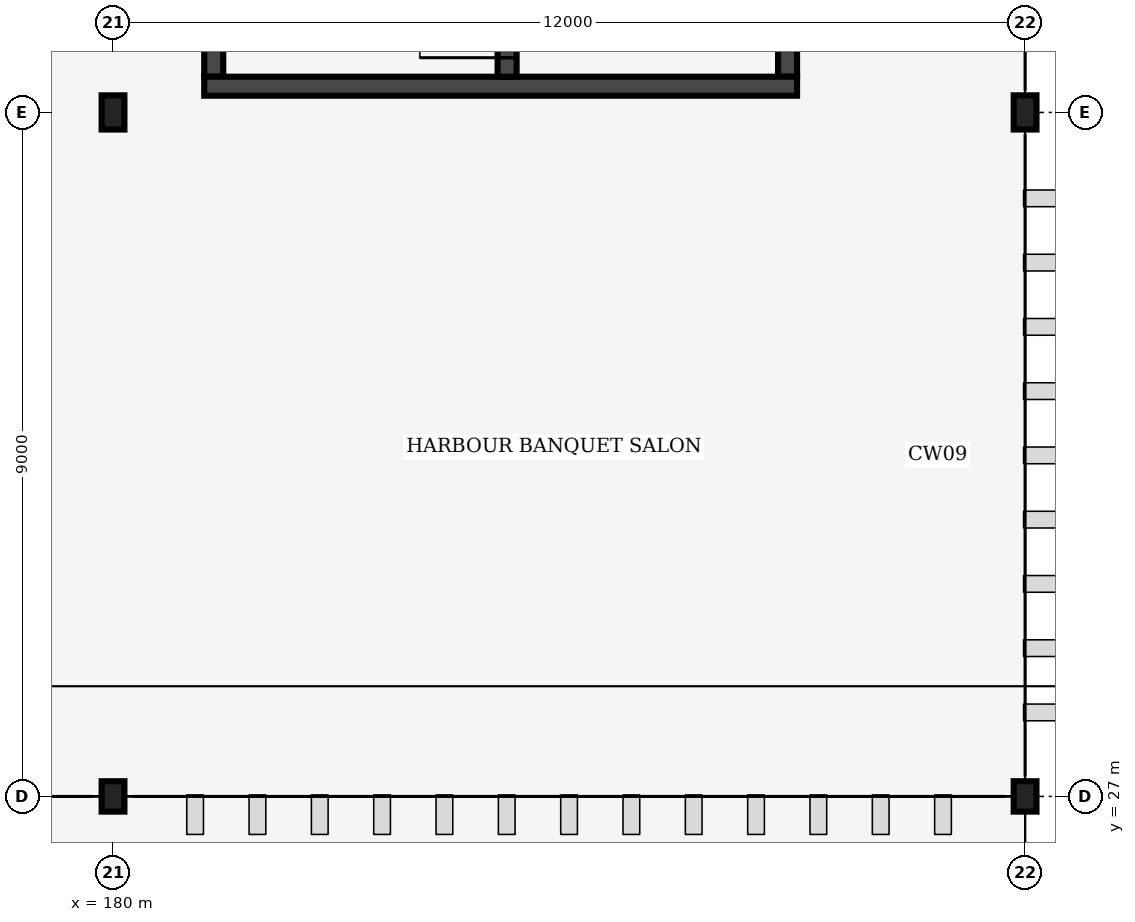
"""IFC4 building model, lengths in metres.
Left out: names, types, materials, properties, quantities, classifications, styles, units other than length and angle.
Written with IfcOpenShell. Run it as: python <this file> out.ifc"""

import sys

from ifc_helpers import new_model, si_unit, direction, frame, frame_2d, origin, origin_2d, place, context, subcontext, project, spatial, rectangle, i_section, extrude, element, fill, save


model = new_model("IFC4")
c1 = context("Model", 3, precision=1e-05, world=origin(), true_north=direction((0.0, 1.0)))
c2 = subcontext(c1, "Body", "Model", "MODEL_VIEW")
j1 = project(units=[si_unit("LENGTHUNIT", "METRE"), si_unit("PLANEANGLEUNIT", "RADIAN")], contexts=[c1])
p1 = place(None, origin())
s1 = spatial("IfcSite", under=j1, at=p1, CompositionType="ELEMENT")
p2 = place(p1, origin())
s2 = spatial("IfcBuilding", under=s1, at=p2, CompositionType="ELEMENT")
p3 = place(p2, frame((0.0, 0.0, 22.8)))
s3 = spatial("IfcBuildingStorey", under=s2, at=p3, CompositionType="ELEMENT", Elevation=22.8)
p4 = place(p3, frame((180.0, 27.0, 0.0), z_axis=(0.0, 0.0, 1.0), x_axis=(1.0, 0.0, 0.0)))
e1 = element("IfcColumn", 1, at=p4, inside=s3, PredefinedType="COLUMN", context=c2, shape_type="SweptSolid", body=[
    extrude(i_section(OverallWidth=0.3, OverallDepth=0.4, WebThickness=0.013, FlangeThickness=0.024, FilletRadius=0.027, at=origin_2d()), origin(), (0.0, 0.0, 1.0), 4.0),
])
p5 = place(p3, frame((180.0, 36.0, 0.0), z_axis=(0.0, 0.0, 1.0), x_axis=(1.0, 0.0, 0.0)))
e2 = element("IfcColumn", 2, at=p5, inside=s3, PredefinedType="COLUMN", context=c2, shape_type="SweptSolid", body=[
    extrude(i_section(OverallWidth=0.3, OverallDepth=0.45, WebThickness=0.014, FlangeThickness=0.026, FilletRadius=0.027, at=origin_2d()), origin(), (0.0, 0.0, 1.0), 4.0),
])
p6 = place(p3, frame((192.0, 27.0, 0.0), z_axis=(0.0, 0.0, 1.0), x_axis=(1.0, 0.0, 0.0)))
e3 = element("IfcColumn", 3, at=p6, inside=s3, PredefinedType="COLUMN", context=c2, shape_type="SweptSolid", body=[
    extrude(i_section(OverallWidth=0.3, OverallDepth=0.4, WebThickness=0.013, FlangeThickness=0.024, FilletRadius=0.027, at=origin_2d()), origin(), (0.0, 0.0, 1.0), 4.0),
])
p7 = place(p3, frame((192.0, 36.0, 0.0), z_axis=(0.0, 0.0, 1.0), x_axis=(1.0, 0.0, 0.0)))
e4 = element("IfcColumn", 4, at=p7, inside=s3, PredefinedType="COLUMN", context=c2, shape_type="SweptSolid", body=[
    extrude(i_section(OverallWidth=0.3, OverallDepth=0.45, WebThickness=0.014, FlangeThickness=0.026, FilletRadius=0.027, at=origin_2d()), origin(), (0.0, 0.0, 1.0), 4.0),
])
p8 = place(p3, frame((181.325, 36.47, 0.0), z_axis=(0.0, 0.0, 1.0), x_axis=(0.0, 1.0, 0.0)))
e5 = element("IfcWall", 5, at=p8, inside=s3, PredefinedType="SHEAR", context=c2, shape_type="SweptSolid", body=[
    extrude(rectangle(XDim=8.06, YDim=0.25, at=frame_2d((4.03, 0.0))), origin(), (0.0, 0.0, 1.0), 3.64),
])
p9 = place(p8, frame((1.15, 0.0, 0.0)))
e6 = element("IfcOpeningElement", 6, at=p9, cuts=e5, PredefinedType="OPENING", context=c2, shape_type="SweptSolid", body=[
    extrude(rectangle(XDim=1.8, YDim=2.2, at=frame_2d((0.9, 1.1))), frame((0.0, 0.135, 0.0), z_axis=(0.0, -1.0, 0.0), x_axis=(1.0, 0.0, 0.0)), (0.0, 0.0, 1.0), 0.27),
])
p10 = place(p3, frame((188.875, 36.47, 0.0), z_axis=(0.0, 0.0, 1.0), x_axis=(0.0, 1.0, 0.0)))
e7 = element("IfcWall", 7, at=p10, inside=s3, PredefinedType="SHEAR", context=c2, shape_type="SweptSolid", body=[
    extrude(rectangle(XDim=8.06, YDim=0.25, at=frame_2d((4.03, 0.0))), origin(), (0.0, 0.0, 1.0), 3.64),
])
p11 = place(p3, frame((181.2, 36.345, 0.0), z_axis=(0.0, 0.0, 1.0), x_axis=(1.0, 0.0, 0.0)))
e8 = element("IfcWall", 8, at=p11, inside=s3, PredefinedType="SHEAR", context=c2, shape_type="SweptSolid", body=[
    extrude(rectangle(XDim=7.8, YDim=0.25, at=frame_2d((3.9, 0.0))), origin(), (0.0, 0.0, 1.0), 3.64),
])
p12 = place(p3, frame((185.185, 36.47, 0.0), z_axis=(0.0, 0.0, 1.0), x_axis=(0.0, 1.0, 0.0)))
e9 = element("IfcWall", 9, at=p12, inside=s3, PredefinedType="SHEAR", context=c2, shape_type="SweptSolid", body=[
    extrude(rectangle(XDim=8.06, YDim=0.25, at=frame_2d((4.03, 0.0))), origin(), (0.0, 0.0, 1.0), 3.64),
])
p13 = place(p12, frame((0.25, 0.0, 0.0)))
e10 = element("IfcOpeningElement", 10, at=p13, cuts=e9, PredefinedType="OPENING", context=c2, shape_type="SweptSolid", body=[
    extrude(rectangle(XDim=1.15, YDim=2.15, at=frame_2d((0.575, 1.075))), frame((0.0, 0.135, 0.0), z_axis=(0.0, -1.0, 0.0), x_axis=(1.0, 0.0, 0.0)), (0.0, 0.0, 1.0), 0.27),
])
p14 = place(p13, origin())
e11 = element("IfcDoor", 11, at=p14, inside=s3, OperationType="SINGLE_SWING_LEFT", PredefinedType="DOOR", context=c2, shape_type="SweptSolid", body=[
    extrude(rectangle(XDim=1.15, YDim=2.15, at=frame_2d((0.575, 1.075))), frame((0.0, 0.025, 0.0), z_axis=(0.0, -1.0, 0.0), x_axis=(1.0, 0.0, 0.0)), (0.0, 0.0, 1.0), 0.05),
])
fill(e10, e11)
save(model, sys.argv[1])
